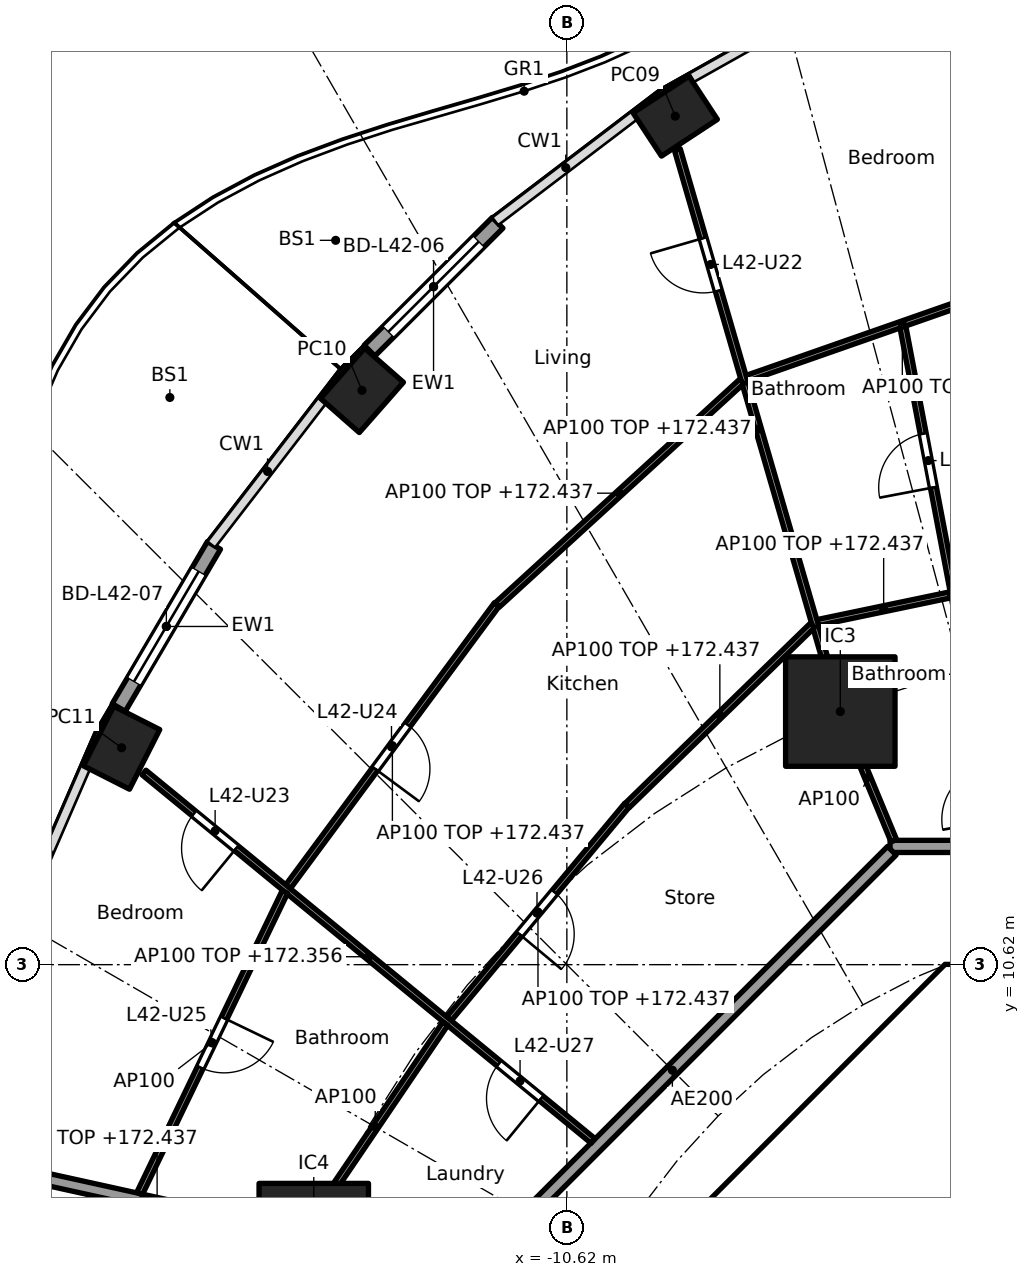
"""IFC4 building model, lengths in metres.
Left out: names, types, materials, properties, quantities, classifications, styles, units other than length and angle.
Written with IfcOpenShell. Run it as: python <this file> out.ifc"""

import sys

from ifc_helpers import new_model, si_unit, direction, frame, frame_2d, origin, origin_2d, place, context, subcontext, project, spatial, polyline, rectangle, hollow_rectangle, outline, extrude, element, fill, save


model = new_model("IFC4")
c1 = context("Model", 3, precision=1e-05, world=origin(), true_north=direction((0.0, 1.0)))
c2 = subcontext(c1, "Body", "Model", "MODEL_VIEW")
j1 = project(units=[si_unit("LENGTHUNIT", "METRE"), si_unit("PLANEANGLEUNIT", "RADIAN")], contexts=[c1])
p1 = place(None, origin())
s1 = spatial("IfcSite", under=j1, at=p1, CompositionType="ELEMENT")
p2 = place(p1, origin())
s2 = spatial("IfcBuilding", under=s1, at=p2, CompositionType="ELEMENT")
p3 = place(p2, frame((0.0, 0.0, 169.6)))
s3 = spatial("IfcBuildingStorey", under=s2, at=p3, CompositionType="ELEMENT", Elevation=169.6)
for number, where, z_axis, x_axis in (
    (1, (-8.837, 24.573, 0.0), (0.0, 0.0, 1.0), (-0.836, -0.549, 0.0)),
    (2, (-13.989, 20.064, 0.0), (0.0, 0.0, 1.0), (-0.66, -0.751, 0.0)),
    (3, (-17.942, 14.188, 0.0), (0.0, 0.0, 1.0), (-0.452, -0.892, 0.0)),
):
    element("IfcColumn", number, at=place(p3, frame(where, z_axis=z_axis, x_axis=x_axis)), inside=s3, PredefinedType="COLUMN", context=c2, shape_type="SweptSolid", body=[
        extrude(hollow_rectangle(XDim=1.1, YDim=0.85, WallThickness=0.036, at=origin_2d()), origin(), (0.0, 0.0, 1.0), 3.7),
    ])
for number, where, z_axis, x_axis in (
    (4, (-6.123, 14.782, 0.0), (0.0, 0.0, 1.0), (1.0, 0.0, 0.0)),
    (5, (-14.782, 6.123, 0.0), (0.0, 0.0, 1.0), (1.0, 0.0, 0.0)),
):
    element("IfcColumn", number, at=place(p3, frame(where, z_axis=z_axis, x_axis=x_axis)), inside=s3, PredefinedType="COLUMN", context=c2, shape_type="SweptSolid", body=[
        extrude(rectangle(XDim=1.8, YDim=1.8, at=origin_2d()), origin(), (0.0, 0.0, 1.0), 3.7),
    ])
p4 = place(p3, frame((-13.865, 20.718, 0.0), z_axis=(0.0, 0.0, 1.0), x_axis=(0.707844845069, 0.706367946122, 0.0)))
e6 = element("IfcWall", 6, at=p4, inside=s3, PredefinedType="SOLIDWALL", context=c2, shape_type="SweptSolid", body=[
    extrude(rectangle(XDim=2.976, YDim=0.25, at=frame_2d((1.488, 0.0))), origin(), (0.0, 0.0, 1.0), 3.44),
])
p5 = place(p4, frame((0.438, 0.0, 0.0)))
e7 = element("IfcOpeningElement", 7, at=p5, cuts=e6, PredefinedType="OPENING", context=c2, shape_type="SweptSolid", body=[
    extrude(rectangle(XDim=2.1, YDim=2.4, at=frame_2d((1.05, 1.2))), frame((0.0, 0.135, 0.0), z_axis=(0.0, -1.0, 0.0), x_axis=(1.0, 0.0, 0.0)), (0.0, 0.0, 1.0), 0.27),
])
p6 = place(p3, frame((-17.989, 14.848, 0.0), z_axis=(0.0, 0.0, 1.0), x_axis=(0.506309086483, 0.862352079458, 0.0)))
e8 = element("IfcWall", 8, at=p6, inside=s3, PredefinedType="SOLIDWALL", context=c2, shape_type="SweptSolid", body=[
    extrude(rectangle(XDim=3.092, YDim=0.25, at=frame_2d((1.546, 0.0))), origin(), (0.0, 0.0, 1.0), 3.44),
])
p7 = place(p6, frame((0.496, 0.0, 0.0)))
e9 = element("IfcOpeningElement", 9, at=p7, cuts=e8, PredefinedType="OPENING", context=c2, shape_type="SweptSolid", body=[
    extrude(rectangle(XDim=2.1, YDim=2.4, at=frame_2d((1.05, 1.2))), frame((0.0, 0.135, 0.0), z_axis=(0.0, -1.0, 0.0), x_axis=(1.0, 0.0, 0.0)), (0.0, 0.0, 1.0), 0.27),
])
p8 = place(p3, frame((-4.613, 9.988, 0.0), z_axis=(0.0, 0.0, 1.0), x_axis=(-0.707106781187, -0.707106781187, 0.0)))
e10 = element("IfcWall", 10, at=p8, inside=s3, PredefinedType="SHEAR", context=c2, shape_type="SweptSolid", body=[
    extrude(rectangle(XDim=7.602, YDim=0.6, at=frame_2d((3.801, 0.0))), origin(), (0.0, 0.0, 1.0), 3.44),
])
p9 = place(p8, frame((0.351, 0.0, 0.0)))
e11 = element("IfcOpeningElement", 11, at=p9, cuts=e10, PredefinedType="OPENING", context=c2, shape_type="SweptSolid", body=[
    extrude(rectangle(XDim=1.1, YDim=2.1, at=frame_2d((0.55, 1.05))), frame((0.0, 0.31, 0.0), z_axis=(0.0, -1.0, 0.0), x_axis=(1.0, 0.0, 0.0)), (0.0, 0.0, 1.0), 0.62),
])
p10 = place(p3, frame((-5.8, 4.3, 0.0), z_axis=(0.0, 0.0, 1.0), x_axis=(0.0, 1.0, 0.0)))
e12 = element("IfcWall", 12, at=p10, inside=s3, PredefinedType="PARTITIONING", context=c2, shape_type="SweptSolid", body=[
    extrude(rectangle(XDim=3.927, YDim=0.15, at=frame_2d((1.963, 0.0))), origin(), (0.0, 0.0, 1.0), 3.44),
])
p11 = place(p10, frame((1.551, 0.0, 0.0)))
e13 = element("IfcOpeningElement", 13, at=p11, cuts=e12, PredefinedType="OPENING", context=c2, shape_type="SweptSolid", body=[
    extrude(rectangle(XDim=0.9, YDim=2.1, at=frame_2d((0.45, 1.05))), frame((0.0, 0.085, 0.0), z_axis=(0.0, -1.0, 0.0), x_axis=(1.0, 0.0, 0.0)), (0.0, 0.0, 1.0), 0.17),
])
p12 = place(p3, origin())
e14 = element("IfcWall", 14, at=p12, inside=s3, PredefinedType="SHEAR", context=c2, shape_type="SweptSolid", body=[
    extrude(outline(polyline([(-4.152, 10.025), (-4.401, 9.776), (-4.825, 10.2), (-4.401, 10.625), (4.401, 10.625), (4.825, 10.2), (4.401, 9.776), (4.152, 10.025), (-4.152, 10.025)])), origin(), (0.0, 0.0, 1.0), 3.44),
])
p13 = place(p3, frame((-14.831, 6.134, 0.0), z_axis=(0.0, 0.0, 1.0), x_axis=(-0.976568396888, 0.215207263354, 0.0)))
e15 = element("IfcWall", 15, at=p13, inside=s3, PredefinedType="PARTITIONING", context=c2, shape_type="SweptSolid", body=[
    extrude(rectangle(XDim=5.177, YDim=0.2, at=frame_2d((2.588, 0.0))), origin(), (0.0, 0.0, 1.0), 2.837),
])
p14 = place(p3, frame((5.104, 12.565, 0.0), z_axis=(0.0, 0.0, 1.0), x_axis=(-1.0, 0.0, 0.0)))
e16 = element("IfcWall", 16, at=p14, inside=s3, PredefinedType="PARTITIONING", context=c2, shape_type="SweptSolid", body=[
    extrude(rectangle(XDim=10.409, YDim=0.2, at=frame_2d((5.205, 0.0))), origin(), (0.0, 0.0, 1.0), 3.44),
])
p15 = place(p14, frame((6.339, 0.0, 0.0)))
e17 = element("IfcOpeningElement", 17, at=p15, cuts=e16, PredefinedType="OPENING", context=c2, shape_type="SweptSolid", body=[
    extrude(rectangle(XDim=1.0, YDim=2.1, at=frame_2d((0.5, 1.05))), frame((0.0, 0.11, 0.0), z_axis=(0.0, -1.0, 0.0), x_axis=(1.0, 0.0, 0.0)), (0.0, 0.0, 1.0), 0.22),
])
p16 = place(p3, frame((-5.275, 12.494, 0.0), z_axis=(0.0, 0.0, 1.0), x_axis=(-0.707106781187, -0.707106781187, 0.0)))
e18 = element("IfcWall", 18, at=p16, inside=s3, PredefinedType="PARTITIONING", context=c2, shape_type="SweptSolid", body=[
    extrude(rectangle(XDim=10.209, YDim=0.2, at=frame_2d((5.104, 0.0))), origin(), (0.0, 0.0, 1.0), 3.44),
])
p17 = place(p3, frame((-2.546, 22.051, 0.0), z_axis=(0.0, 0.0, 1.0), x_axis=(-0.943911038661, -0.330199865375, 0.0)))
e19 = element("IfcWall", 19, at=p17, inside=s3, PredefinedType="PARTITIONING", context=c2, shape_type="SweptSolid", body=[
    extrude(rectangle(XDim=5.417, YDim=0.1, at=frame_2d((2.709, 0.0))), origin(), (0.0, 0.0, 1.0), 2.837),
])
p18 = place(p3, frame((-3.488, 12.663, 0.0), z_axis=(0.0, 0.0, 1.0), x_axis=(-0.186783185485, 0.982401161247, 0.0)))
e20 = element("IfcWall", 20, at=p18, inside=s3, PredefinedType="PARTITIONING", context=c2, shape_type="SweptSolid", body=[
    extrude(rectangle(XDim=8.595, YDim=0.1, at=frame_2d((4.298, 0.0))), origin(), (0.0, 0.0, 1.0), 2.756),
])
p19 = place(p18, frame((0.35, 0.0, 0.0)))
e21 = element("IfcOpeningElement", 21, at=p19, cuts=e20, PredefinedType="OPENING", context=c2, shape_type="SweptSolid", body=[
    extrude(rectangle(XDim=0.9, YDim=2.1, at=frame_2d((0.45, 1.05))), frame((0.0, 0.06, 0.0), z_axis=(0.0, -1.0, 0.0), x_axis=(1.0, 0.0, 0.0)), (0.0, 0.0, 1.0), 0.12),
])
p20 = place(p18, frame((5.908, 0.0, 0.0)))
e22 = element("IfcOpeningElement", 22, at=p20, cuts=e20, PredefinedType="OPENING", context=c2, shape_type="SweptSolid", body=[
    extrude(rectangle(XDim=0.9, YDim=2.1, at=frame_2d((0.45, 1.05))), frame((0.0, 0.06, 0.0), z_axis=(0.0, -1.0, 0.0), x_axis=(1.0, 0.0, 0.0)), (0.0, 0.0, 1.0), 0.12),
])
p21 = place(p3, frame((-4.324, 16.699, 0.0), z_axis=(0.0, 0.0, 1.0), x_axis=(-0.978908011866, -0.204301503432, 0.0)))
e23 = element("IfcWall", 23, at=p21, inside=s3, PredefinedType="PARTITIONING", context=c2, shape_type="SweptSolid", body=[
    extrude(rectangle(XDim=2.218, YDim=0.1, at=frame_2d((1.109, 0.0))), origin(), (0.0, 0.0, 1.0), 2.837),
])
p22 = place(p3, frame((-5.243, 12.657, 0.0), z_axis=(0.0, 0.0, 1.0), x_axis=(-0.382719158442, 0.923864733477, 0.0)))
e24 = element("IfcWall", 24, at=p22, inside=s3, PredefinedType="PARTITIONING", context=c2, shape_type="SweptSolid", body=[
    extrude(rectangle(XDim=2.25, YDim=0.1, at=frame_2d((1.125, 0.0))), origin(), (0.0, 0.0, 1.0), 3.44),
])
p23 = place(p3, frame((-6.137, 14.83, 0.0), z_axis=(0.0, 0.0, 1.0), x_axis=(-0.278461169897, 0.96044748782, 0.0)))
e25 = element("IfcWall", 25, at=p23, inside=s3, PredefinedType="PARTITIONING", context=c2, shape_type="SweptSolid", body=[
    extrude(rectangle(XDim=9.573, YDim=0.1, at=frame_2d((4.787, 0.0))), origin(), (0.0, 0.0, 1.0), 2.837),
])
p24 = place(p23, frame((7.156, 0.0, 0.0)))
e26 = element("IfcOpeningElement", 26, at=p24, cuts=e25, PredefinedType="OPENING", context=c2, shape_type="SweptSolid", body=[
    extrude(rectangle(XDim=0.9, YDim=2.1, at=frame_2d((0.45, 1.05))), frame((0.0, 0.06, 0.0), z_axis=(0.0, -1.0, 0.0), x_axis=(1.0, 0.0, 0.0)), (0.0, 0.0, 1.0), 0.12),
])
p25 = place(p3, frame((-6.58, 16.201, 0.0), z_axis=(0.0, 0.0, 1.0), x_axis=(-0.716946269374, -0.697128429223, 0.0)))
e27 = element("IfcWall", 27, at=p25, inside=s3, PredefinedType="PARTITIONING", context=c2, shape_type="SweptSolid", body=[
    extrude(rectangle(XDim=4.25, YDim=0.1, at=frame_2d((2.125, 0.0))), origin(), (0.0, 0.0, 1.0), 2.837),
])
p26 = place(p3, frame((-7.744, 20.212, 0.0), z_axis=(0.0, 0.0, 1.0), x_axis=(-0.738051761282, -0.674744097913, 0.0)))
e28 = element("IfcWall", 28, at=p26, inside=s3, PredefinedType="PARTITIONING", context=c2, shape_type="SweptSolid", body=[
    extrude(rectangle(XDim=5.449, YDim=0.1, at=frame_2d((2.725, 0.0))), origin(), (0.0, 0.0, 1.0), 2.837),
])
p27 = place(p3, frame((-9.631, 13.242, 0.0), z_axis=(0.0, 0.0, 1.0), x_axis=(-0.640315711982, -0.768111833647, 0.0)))
e29 = element("IfcWall", 29, at=p27, inside=s3, PredefinedType="PARTITIONING", context=c2, shape_type="SweptSolid", body=[
    extrude(rectangle(XDim=4.572, YDim=0.1, at=frame_2d((2.286, 0.0))), origin(), (0.0, 0.0, 1.0), 2.837),
])
p28 = place(p27, frame((1.861, 0.0, 0.0)))
e30 = element("IfcOpeningElement", 30, at=p28, cuts=e29, PredefinedType="OPENING", context=c2, shape_type="SweptSolid", body=[
    extrude(rectangle(XDim=0.9, YDim=2.1, at=frame_2d((0.45, 1.05))), frame((0.0, 0.06, 0.0), z_axis=(0.0, -1.0, 0.0), x_axis=(1.0, 0.0, 0.0)), (0.0, 0.0, 1.0), 0.12),
])
p29 = place(p3, frame((-11.773, 16.542, 0.0), z_axis=(0.0, 0.0, 1.0), x_axis=(-0.594694305999, -0.803951915485, 0.0)))
e31 = element("IfcWall", 31, at=p29, inside=s3, PredefinedType="PARTITIONING", context=c2, shape_type="SweptSolid", body=[
    extrude(rectangle(XDim=5.772, YDim=0.1, at=frame_2d((2.886, 0.0))), origin(), (0.0, 0.0, 1.0), 2.837),
])
p30 = place(p29, frame((2.461, 0.0, 0.0)))
e32 = element("IfcOpeningElement", 32, at=p30, cuts=e31, PredefinedType="OPENING", context=c2, shape_type="SweptSolid", body=[
    extrude(rectangle(XDim=0.9, YDim=2.1, at=frame_2d((0.45, 1.05))), frame((0.0, 0.06, 0.0), z_axis=(0.0, -1.0, 0.0), x_axis=(1.0, 0.0, 0.0)), (0.0, 0.0, 1.0), 0.12),
])
p31 = place(p3, frame((-10.189, 7.721, 0.0), z_axis=(0.0, 0.0, 1.0), x_axis=(-0.773134429339, 0.634242188892, 0.0)))
e33 = element("IfcWall", 33, at=p31, inside=s3, PredefinedType="PARTITIONING", context=c2, shape_type="SweptSolid", body=[
    extrude(rectangle(XDim=9.552, YDim=0.1, at=frame_2d((4.776, 0.0))), origin(), (0.0, 0.0, 1.0), 2.756),
])
p32 = place(p31, frame((7.59, 0.0, 0.0)))
e34 = element("IfcOpeningElement", 34, at=p32, cuts=e33, PredefinedType="OPENING", context=c2, shape_type="SweptSolid", body=[
    extrude(rectangle(XDim=0.9, YDim=2.1, at=frame_2d((0.45, 1.05))), frame((0.0, 0.06, 0.0), z_axis=(0.0, -1.0, 0.0), x_axis=(1.0, 0.0, 0.0)), (0.0, 0.0, 1.0), 0.12),
])
p33 = place(p31, frame((1.104, 0.0, 0.0)))
e35 = element("IfcOpeningElement", 35, at=p33, cuts=e33, PredefinedType="OPENING", context=c2, shape_type="SweptSolid", body=[
    extrude(rectangle(XDim=0.9, YDim=2.1, at=frame_2d((0.45, 1.05))), frame((0.0, 0.06, 0.0), z_axis=(0.0, -1.0, 0.0), x_axis=(1.0, 0.0, 0.0)), (0.0, 0.0, 1.0), 0.12),
])
p34 = place(p3, frame((-12.619, 9.65, 0.0), z_axis=(0.0, 0.0, 1.0), x_axis=(-0.561046521684, -0.82778427172, 0.0)))
e36 = element("IfcWall", 36, at=p34, inside=s3, PredefinedType="PARTITIONING", context=c2, shape_type="SweptSolid", body=[
    extrude(rectangle(XDim=4.109, YDim=0.1, at=frame_2d((2.054, 0.0))), origin(), (0.0, 0.0, 1.0), 3.44),
])
p35 = place(p3, frame((-15.257, 11.816, 0.0), z_axis=(0.0, 0.0, 1.0), x_axis=(-0.434027506504, -0.900899619046, 0.0)))
e37 = element("IfcWall", 37, at=p35, inside=s3, PredefinedType="PARTITIONING", context=c2, shape_type="SweptSolid", body=[
    extrude(rectangle(XDim=5.508, YDim=0.1, at=frame_2d((2.754, 0.0))), origin(), (0.0, 0.0, 1.0), 3.44),
])
p36 = place(p35, frame((2.304, 0.0, 0.0)))
e38 = element("IfcOpeningElement", 38, at=p36, cuts=e37, PredefinedType="OPENING", context=c2, shape_type="SweptSolid", body=[
    extrude(rectangle(XDim=0.9, YDim=2.1, at=frame_2d((0.45, 1.05))), frame((0.0, 0.06, 0.0), z_axis=(0.0, -1.0, 0.0), x_axis=(1.0, 0.0, 0.0)), (0.0, 0.0, 1.0), 0.12),
])
p37 = place(p5, origin())
e39 = element("IfcDoor", 39, at=p37, inside=s3, OperationType="SLIDING_TO_LEFT", PredefinedType="DOOR", context=c2, shape_type="SweptSolid", body=[
    extrude(rectangle(XDim=2.1, YDim=2.4, at=frame_2d((1.05, 1.2))), frame((0.0, 0.025, 0.0), z_axis=(0.0, -1.0, 0.0), x_axis=(1.0, 0.0, 0.0)), (0.0, 0.0, 1.0), 0.05),
])
fill(e7, e39)
p38 = place(p7, origin())
e40 = element("IfcDoor", 40, at=p38, inside=s3, OperationType="SLIDING_TO_LEFT", PredefinedType="DOOR", context=c2, shape_type="SweptSolid", body=[
    extrude(rectangle(XDim=2.1, YDim=2.4, at=frame_2d((1.05, 1.2))), frame((0.0, 0.025, 0.0), z_axis=(0.0, -1.0, 0.0), x_axis=(1.0, 0.0, 0.0)), (0.0, 0.0, 1.0), 0.05),
])
fill(e9, e40)
p39 = place(p9, origin())
e41 = element("IfcDoor", 41, at=p39, inside=s3, OperationType="SINGLE_SWING_RIGHT", PredefinedType="DOOR", context=c2, shape_type="SweptSolid", body=[
    extrude(rectangle(XDim=1.1, YDim=2.1, at=frame_2d((0.55, 1.05))), frame((0.0, 0.025, 0.0), z_axis=(0.0, -1.0, 0.0), x_axis=(1.0, 0.0, 0.0)), (0.0, 0.0, 1.0), 0.05),
])
fill(e11, e41)
p40 = place(p20, origin())
e42 = element("IfcDoor", 42, at=p40, inside=s3, OperationType="SINGLE_SWING_LEFT", PredefinedType="DOOR", context=c2, shape_type="SweptSolid", body=[
    extrude(rectangle(XDim=0.9, YDim=2.1, at=frame_2d((0.45, 1.05))), frame((0.0, 0.025, 0.0), z_axis=(0.0, -1.0, 0.0), x_axis=(1.0, 0.0, 0.0)), (0.0, 0.0, 1.0), 0.05),
])
fill(e22, e42)
p41 = place(p24, origin())
e43 = element("IfcDoor", 43, at=p41, inside=s3, OperationType="SINGLE_SWING_RIGHT", PredefinedType="DOOR", context=c2, shape_type="SweptSolid", body=[
    extrude(rectangle(XDim=0.9, YDim=2.1, at=frame_2d((0.45, 1.05))), frame((0.0, 0.025, 0.0), z_axis=(0.0, -1.0, 0.0), x_axis=(1.0, 0.0, 0.0)), (0.0, 0.0, 1.0), 0.05),
])
fill(e26, e43)
p42 = place(p32, origin())
e44 = element("IfcDoor", 44, at=p42, inside=s3, OperationType="SINGLE_SWING_LEFT", PredefinedType="DOOR", context=c2, shape_type="SweptSolid", body=[
    extrude(rectangle(XDim=0.9, YDim=2.1, at=frame_2d((0.45, 1.05))), frame((0.0, 0.025, 0.0), z_axis=(0.0, -1.0, 0.0), x_axis=(1.0, 0.0, 0.0)), (0.0, 0.0, 1.0), 0.05),
])
fill(e34, e44)
p43 = place(p30, origin())
e45 = element("IfcDoor", 45, at=p43, inside=s3, OperationType="SINGLE_SWING_RIGHT", PredefinedType="DOOR", context=c2, shape_type="SweptSolid", body=[
    extrude(rectangle(XDim=0.9, YDim=2.1, at=frame_2d((0.45, 1.05))), frame((0.0, 0.025, 0.0), z_axis=(0.0, -1.0, 0.0), x_axis=(1.0, 0.0, 0.0)), (0.0, 0.0, 1.0), 0.05),
])
fill(e32, e45)
p44 = place(p36, origin())
e46 = element("IfcDoor", 46, at=p44, inside=s3, OperationType="SINGLE_SWING_LEFT", PredefinedType="DOOR", context=c2, shape_type="SweptSolid", body=[
    extrude(rectangle(XDim=0.9, YDim=2.1, at=frame_2d((0.45, 1.05))), frame((0.0, 0.025, 0.0), z_axis=(0.0, -1.0, 0.0), x_axis=(1.0, 0.0, 0.0)), (0.0, 0.0, 1.0), 0.05),
])
fill(e38, e46)
p45 = place(p28, origin())
e47 = element("IfcDoor", 47, at=p45, inside=s3, OperationType="SINGLE_SWING_RIGHT", PredefinedType="DOOR", context=c2, shape_type="SweptSolid", body=[
    extrude(rectangle(XDim=0.9, YDim=2.1, at=frame_2d((0.45, 1.05))), frame((0.0, 0.025, 0.0), z_axis=(0.0, -1.0, 0.0), x_axis=(1.0, 0.0, 0.0)), (0.0, 0.0, 1.0), 0.05),
])
fill(e30, e47)
p46 = place(p33, origin())
e48 = element("IfcDoor", 48, at=p46, inside=s3, OperationType="SINGLE_SWING_LEFT", PredefinedType="DOOR", context=c2, shape_type="SweptSolid", body=[
    extrude(rectangle(XDim=0.9, YDim=2.1, at=frame_2d((0.45, 1.05))), frame((0.0, 0.025, 0.0), z_axis=(0.0, -1.0, 0.0), x_axis=(1.0, 0.0, 0.0)), (0.0, 0.0, 1.0), 0.05),
])
fill(e35, e48)
save(model, sys.argv[1])
